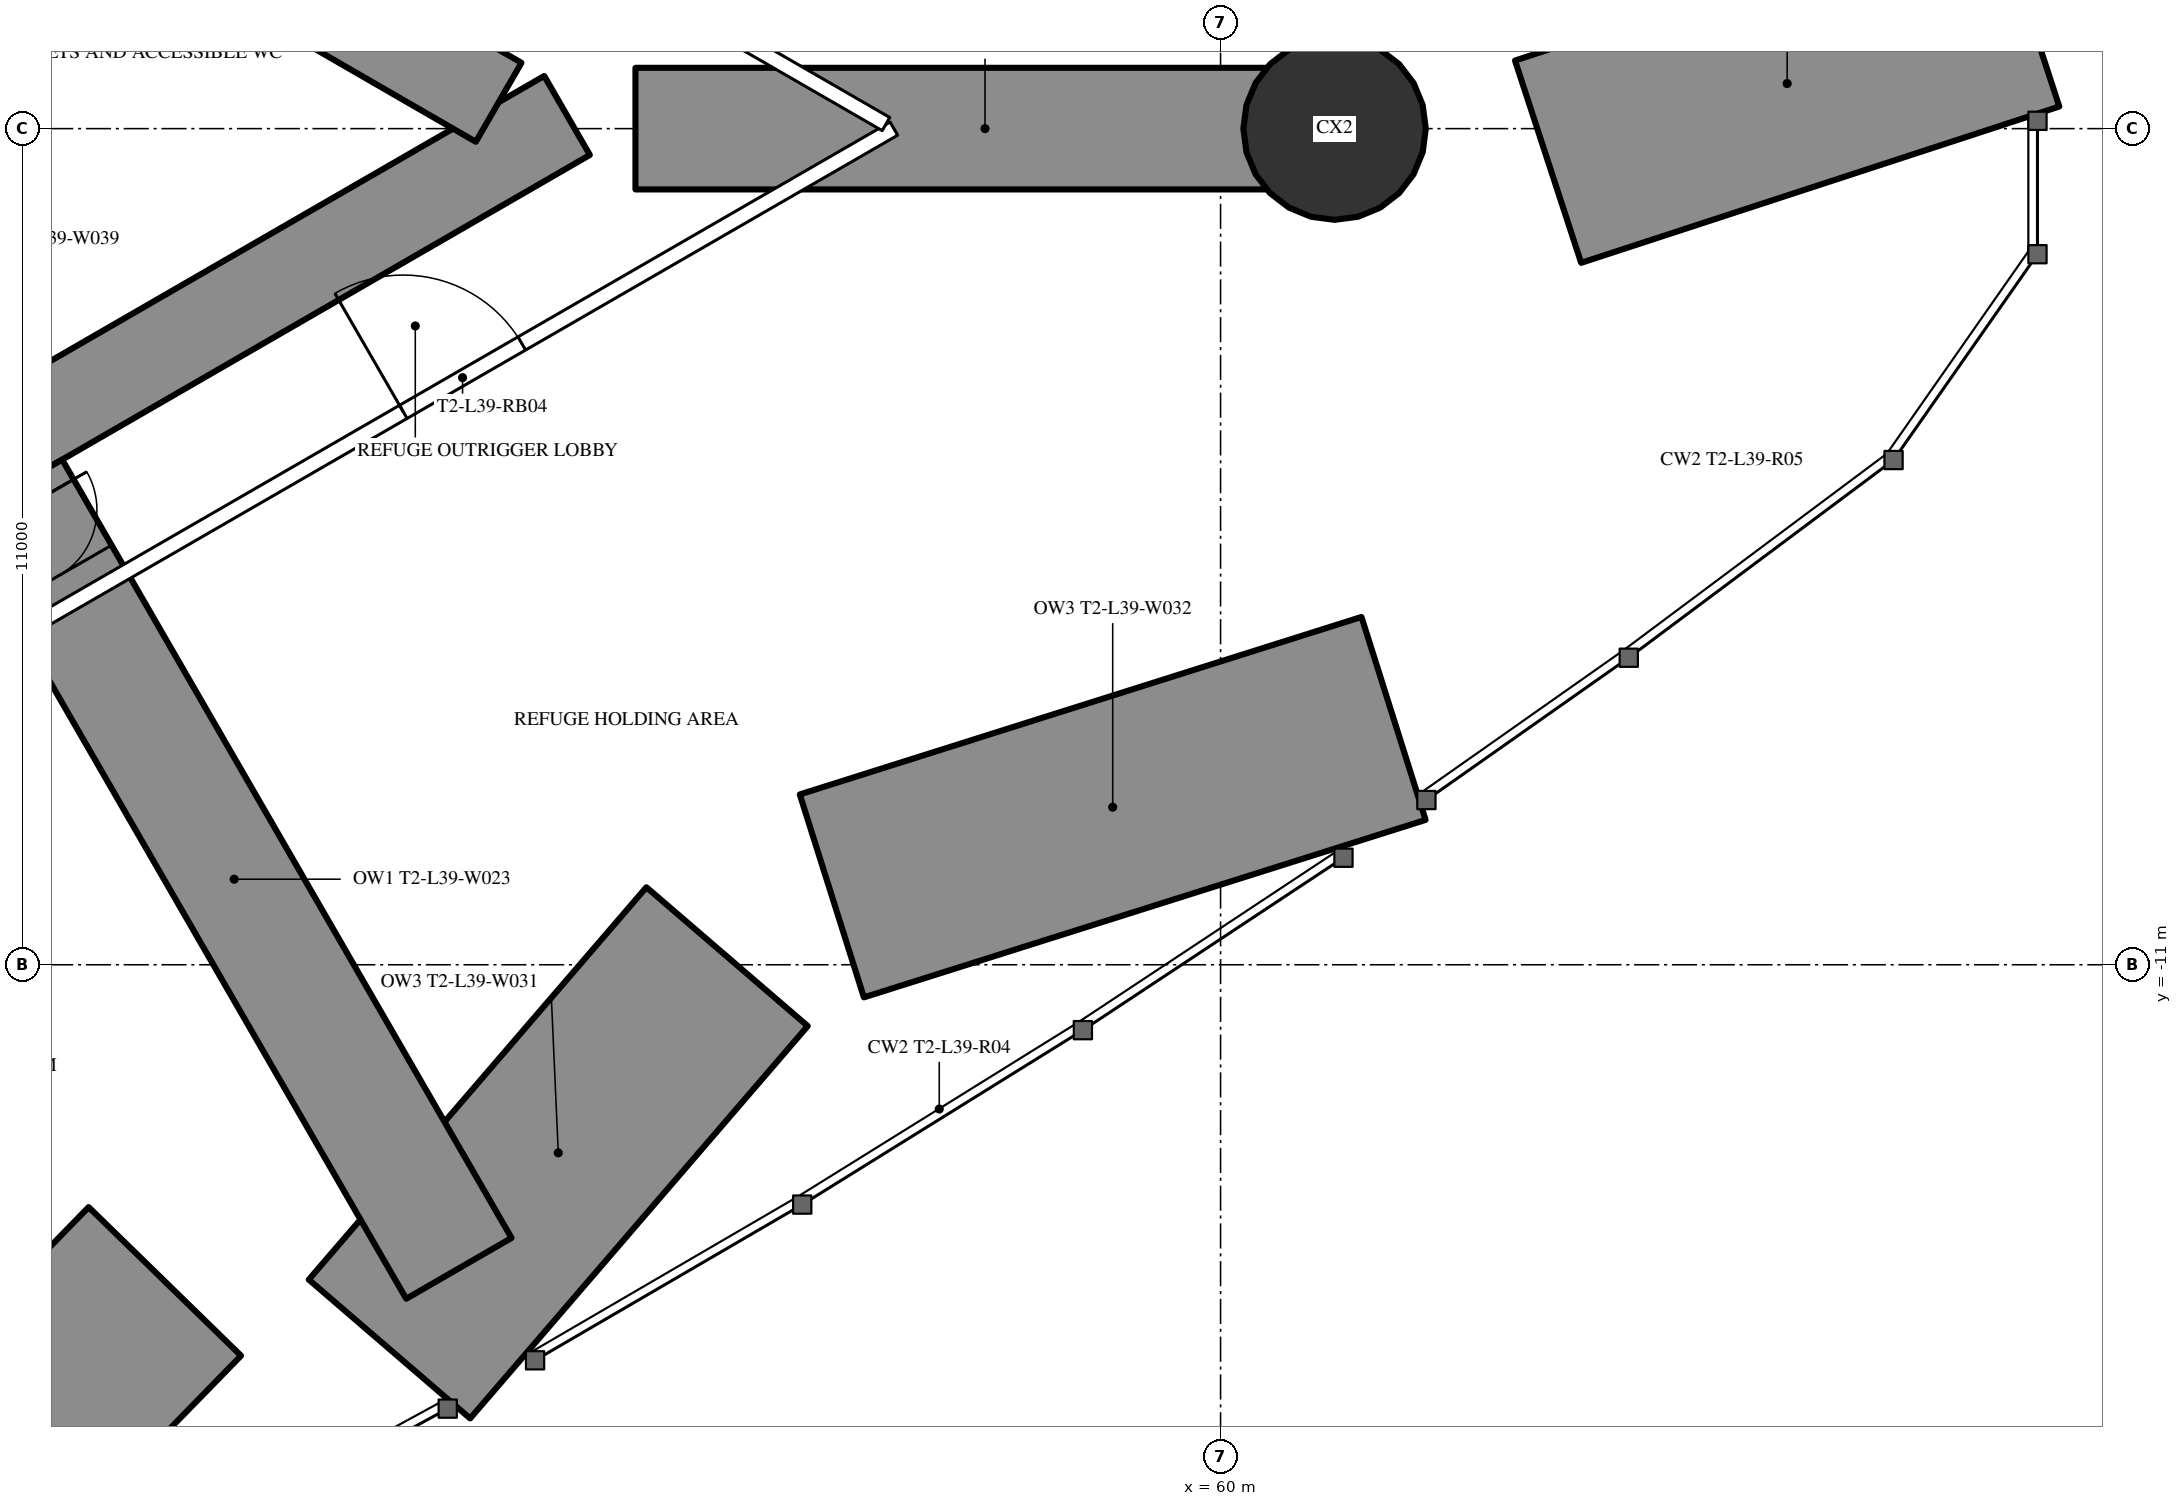
"""IFC4 building model, lengths in metres.
Left out: names, types, materials, properties, quantities, classifications, styles, units other than length and angle.
Written with IfcOpenShell. Run it as: python <this file> out.ifc"""

import sys

from ifc_helpers import new_model, si_unit, direction, frame, frame_2d, origin, origin_2d, place, context, subcontext, project, spatial, rectangle, circle, extrude, element, fill, save


model = new_model("IFC4")
c1 = context("Model", 3, precision=1e-05, world=origin(), true_north=direction((0.0, 1.0)))
c2 = subcontext(c1, "Body", "Model", "MODEL_VIEW")
j1 = project(units=[si_unit("LENGTHUNIT", "METRE"), si_unit("PLANEANGLEUNIT", "RADIAN")], contexts=[c1])
p1 = place(None, origin())
s1 = spatial("IfcSite", under=j1, at=p1, CompositionType="ELEMENT")
p2 = place(p1, origin())
s2 = spatial("IfcBuilding", under=s1, at=p2, CompositionType="ELEMENT")
p3 = place(p2, frame((0.0, 0.0, 146.7)))
s3 = spatial("IfcBuildingStorey", under=s2, at=p3, CompositionType="ELEMENT", Elevation=146.7)
p4 = place(p3, frame((70.6, 1.622, 0.0), z_axis=(0.0, 0.0, 1.0), x_axis=(-0.95049343947, -0.31074462429, 0.0)))
e1 = element("IfcWall", 1, at=p4, inside=s3, PredefinedType="SHEAR", context=c2, shape_type="SweptSolid", body=[
    extrude(rectangle(XDim=6.618, YDim=2.8, at=frame_2d((3.309, 0.0))), origin(), (0.0, 0.0, 1.0), 6.0),
])
p5 = place(p3, frame((41.389, -20.01, 0.0), z_axis=(0.0, 0.0, 1.0), x_axis=(0.698062666637, 0.716036670463, 0.0)))
e2 = element("IfcWall", 2, at=p5, inside=s3, PredefinedType="SHEAR", context=c2, shape_type="SweptSolid", body=[
    extrude(rectangle(XDim=6.764, YDim=2.8, at=frame_2d((3.382, 0.0))), origin(), (0.0, 0.0, 1.0), 6.0),
])
p6 = place(p3, frame((49.066, -16.055, 0.0), z_axis=(0.0, 0.0, 1.0), x_axis=(0.652228022196, 0.758022827534, 0.0)))
e3 = element("IfcWall", 3, at=p6, inside=s3, PredefinedType="SHEAR", context=c2, shape_type="SweptSolid", body=[
    extrude(rectangle(XDim=6.81, YDim=2.8, at=frame_2d((3.405, 0.0))), origin(), (0.0, 0.0, 1.0), 6.0),
])
p7 = place(p3, frame((62.276, -7.76, 0.0), z_axis=(0.0, 0.0, 1.0), x_axis=(-0.953540281048, -0.30126555133, 0.0)))
e4 = element("IfcWall", 4, at=p7, inside=s3, PredefinedType="SHEAR", context=c2, shape_type="SweptSolid", body=[
    extrude(rectangle(XDim=7.75, YDim=2.8, at=frame_2d((3.875, 0.0))), origin(), (0.0, 0.0, 1.0), 6.0),
])
p8 = place(p3, frame((61.5, 0.0, 0.0), z_axis=(0.0, 0.0, 1.0), x_axis=(1.0, 0.0, 0.0)))
e5 = element("IfcColumn", 5, at=p8, inside=s3, PredefinedType="COLUMN", context=c2, shape_type="SweptSolid", body=[
    extrude(circle(Radius=1.2, at=origin_2d()), origin(), (0.0, 0.0, 1.0), 6.0),
])
p9 = place(p3, frame((27.2, -13.8, 0.0), z_axis=(0.0, 0.0, 1.0), x_axis=(0.866027159892, 0.499996958321, 0.0)))
e6 = element("IfcWall", 6, at=p9, inside=s3, PredefinedType="SHEAR", context=c2, shape_type="SweptSolid", body=[
    extrude(rectangle(XDim=27.947, YDim=1.2, at=frame_2d((13.973, 0.0))), origin(), (0.0, 0.0, 1.0), 6.0),
])
p10 = place(p9, frame((4.6, 0.0, 0.0)))
e7 = element("IfcOpeningElement", 7, at=p10, cuts=e6, PredefinedType="OPENING", context=c2, shape_type="SweptSolid", body=[
    extrude(rectangle(XDim=1.0, YDim=2.2, at=frame_2d((0.5, 1.1))), frame((0.0, 0.61, 0.0), z_axis=(0.0, -1.0, 0.0), x_axis=(1.0, 0.0, 0.0)), (0.0, 0.0, 1.0), 1.22),
])
p11 = place(p9, frame((13.568, 0.0, 0.0)))
e8 = element("IfcOpeningElement", 8, at=p11, cuts=e6, PredefinedType="OPENING", context=c2, shape_type="SweptSolid", body=[
    extrude(rectangle(XDim=1.8, YDim=2.2, at=frame_2d((0.9, 1.1))), frame((0.0, 0.61, 0.0), z_axis=(0.0, -1.0, 0.0), x_axis=(1.0, 0.0, 0.0)), (0.0, 0.0, 1.0), 1.22),
])
p12 = place(p3, frame((27.2, 13.8, 0.0), z_axis=(0.0, 0.0, 1.0), x_axis=(0.866024515034, -0.500001539357, 0.0)))
e9 = element("IfcWall", 9, at=p12, inside=s3, PredefinedType="SHEAR", context=c2, shape_type="SweptSolid", body=[
    extrude(rectangle(XDim=26.907, YDim=1.2, at=frame_2d((13.454, 0.0))), origin(), (0.0, 0.0, 1.0), 6.0),
])
p13 = place(p12, frame((4.6, 0.0, 0.0)))
e10 = element("IfcOpeningElement", 10, at=p13, cuts=e9, PredefinedType="OPENING", context=c2, shape_type="SweptSolid", body=[
    extrude(rectangle(XDim=1.0, YDim=2.2, at=frame_2d((0.5, 1.1))), frame((0.0, 0.61, 0.0), z_axis=(0.0, -1.0, 0.0), x_axis=(1.0, 0.0, 0.0)), (0.0, 0.0, 1.0), 1.22),
])
p14 = place(p12, frame((13.568, 0.0, 0.0)))
e11 = element("IfcOpeningElement", 11, at=p14, cuts=e9, PredefinedType="OPENING", context=c2, shape_type="SweptSolid", body=[
    extrude(rectangle(XDim=1.8, YDim=2.2, at=frame_2d((0.9, 1.1))), frame((0.0, 0.61, 0.0), z_axis=(0.0, -1.0, 0.0), x_axis=(1.0, 0.0, 0.0)), (0.0, 0.0, 1.0), 1.22),
])
p15 = place(p3, frame((44.067, -4.754, 0.0), z_axis=(0.0, 0.0, 1.0), x_axis=(0.499987574995, -0.866032577246, 0.0)))
e12 = element("IfcWall", 12, at=p15, inside=s3, PredefinedType="SHEAR", context=c2, shape_type="SweptSolid", body=[
    extrude(rectangle(XDim=11.824, YDim=1.6, at=frame_2d((5.912, 0.0))), origin(), (0.0, 0.0, 1.0), 6.0),
])
p16 = place(p15, frame((0.3, 0.0, 0.0)))
e13 = element("IfcOpeningElement", 13, at=p16, cuts=e12, PredefinedType="OPENING", context=c2, shape_type="SweptSolid", body=[
    extrude(rectangle(XDim=1.0, YDim=2.2, at=frame_2d((0.5, 1.1))), frame((0.0, 0.81, 0.0), z_axis=(0.0, -1.0, 0.0), x_axis=(1.0, 0.0, 0.0)), (0.0, 0.0, 1.0), 1.62),
])
p17 = place(p3, frame((52.302, 0.0, 0.0), z_axis=(0.0, 0.0, 1.0), x_axis=(1.0, 0.0, 0.0)))
e14 = element("IfcWall", 14, at=p17, inside=s3, PredefinedType="SHEAR", context=c2, shape_type="SweptSolid", body=[
    extrude(rectangle(XDim=9.198, YDim=1.6, at=frame_2d((4.599, 0.0))), origin(), (0.0, 0.0, 1.0), 6.0),
])
p18 = place(p3, frame((27.572, -16.241, 0.0), z_axis=(0.0, 0.0, 1.0), x_axis=(0.86602499815, 0.500000702579, 0.0)))
e15 = element("IfcWall", 15, at=p18, inside=s3, PredefinedType="PARTITIONING", context=c2, shape_type="SweptSolid", body=[
    extrude(rectangle(XDim=32.482, YDim=0.2, at=frame_2d((16.241, 0.0))), origin(), (0.0, 0.0, 1.0), 5.75),
])
p19 = place(p18, frame((4.875, 0.0, 0.0)))
e16 = element("IfcOpeningElement", 16, at=p19, cuts=e15, PredefinedType="OPENING", context=c2, shape_type="SweptSolid", body=[
    extrude(rectangle(XDim=1.8, YDim=2.2, at=frame_2d((0.9, 1.1))), frame((0.0, 0.11, 0.0), z_axis=(0.0, -1.0, 0.0), x_axis=(1.0, 0.0, 0.0)), (0.0, 0.0, 1.0), 0.22),
])
p20 = place(p18, frame((14.24, 0.0, 0.0)))
e17 = element("IfcOpeningElement", 17, at=p20, cuts=e15, PredefinedType="OPENING", context=c2, shape_type="SweptSolid", body=[
    extrude(rectangle(XDim=2.0, YDim=2.4, at=frame_2d((1.0, 1.2))), frame((0.0, 0.11, 0.0), z_axis=(0.0, -1.0, 0.0), x_axis=(1.0, 0.0, 0.0)), (0.0, 0.0, 1.0), 0.22),
])
p21 = place(p18, frame((25.029, 0.0, 0.0)))
e18 = element("IfcOpeningElement", 18, at=p21, cuts=e15, PredefinedType="OPENING", context=c2, shape_type="SweptSolid", body=[
    extrude(rectangle(XDim=1.8, YDim=2.2, at=frame_2d((0.9, 1.1))), frame((0.0, 0.11, 0.0), z_axis=(0.0, -1.0, 0.0), x_axis=(1.0, 0.0, 0.0)), (0.0, 0.0, 1.0), 0.22),
])
p22 = place(p3, frame((36.834, 10.894, 0.0), z_axis=(0.0, 0.0, 1.0), x_axis=(0.866028157229, -0.499995230863, 0.0)))
e19 = element("IfcWall", 19, at=p22, inside=s3, PredefinedType="PARTITIONING", context=c2, shape_type="SweptSolid", body=[
    extrude(rectangle(XDim=21.667, YDim=0.2, at=frame_2d((10.833, 0.0))), origin(), (0.0, 0.0, 1.0), 5.75),
])
p23 = place(p22, frame((16.236, 0.0, 0.0)))
e20 = element("IfcOpeningElement", 20, at=p23, cuts=e19, PredefinedType="OPENING", context=c2, shape_type="SweptSolid", body=[
    extrude(rectangle(XDim=1.8, YDim=2.2, at=frame_2d((0.9, 1.1))), frame((0.0, 0.11, 0.0), z_axis=(0.0, -1.0, 0.0), x_axis=(1.0, 0.0, 0.0)), (0.0, 0.0, 1.0), 0.22),
])
p24 = place(p22, frame((5.796, 0.0, 0.0)))
e21 = element("IfcOpeningElement", 21, at=p24, cuts=e19, PredefinedType="OPENING", context=c2, shape_type="SweptSolid", body=[
    extrude(rectangle(XDim=1.8, YDim=2.2, at=frame_2d((0.9, 1.1))), frame((0.0, 0.11, 0.0), z_axis=(0.0, -1.0, 0.0), x_axis=(1.0, 0.0, 0.0)), (0.0, 0.0, 1.0), 0.22),
])
p25 = place(p16, origin())
e22 = element("IfcDoor", 22, at=p25, inside=s3, OperationType="SINGLE_SWING_LEFT", PredefinedType="DOOR", context=c2, shape_type="SweptSolid", body=[
    extrude(rectangle(XDim=1.0, YDim=2.2, at=frame_2d((0.5, 1.1))), frame((0.0, 0.025, 0.0), z_axis=(0.0, -1.0, 0.0), x_axis=(1.0, 0.0, 0.0)), (0.0, 0.0, 1.0), 0.05),
])
fill(e13, e22)
p26 = place(p21, origin())
e23 = element("IfcDoor", 23, at=p26, inside=s3, OperationType="DOUBLE_DOOR_SINGLE_SWING", PredefinedType="DOOR", context=c2, shape_type="SweptSolid", body=[
    extrude(rectangle(XDim=1.8, YDim=2.2, at=frame_2d((0.9, 1.1))), frame((0.0, 0.025, 0.0), z_axis=(0.0, -1.0, 0.0), x_axis=(1.0, 0.0, 0.0)), (0.0, 0.0, 1.0), 0.05),
])
fill(e18, e23)
save(model, sys.argv[1])
